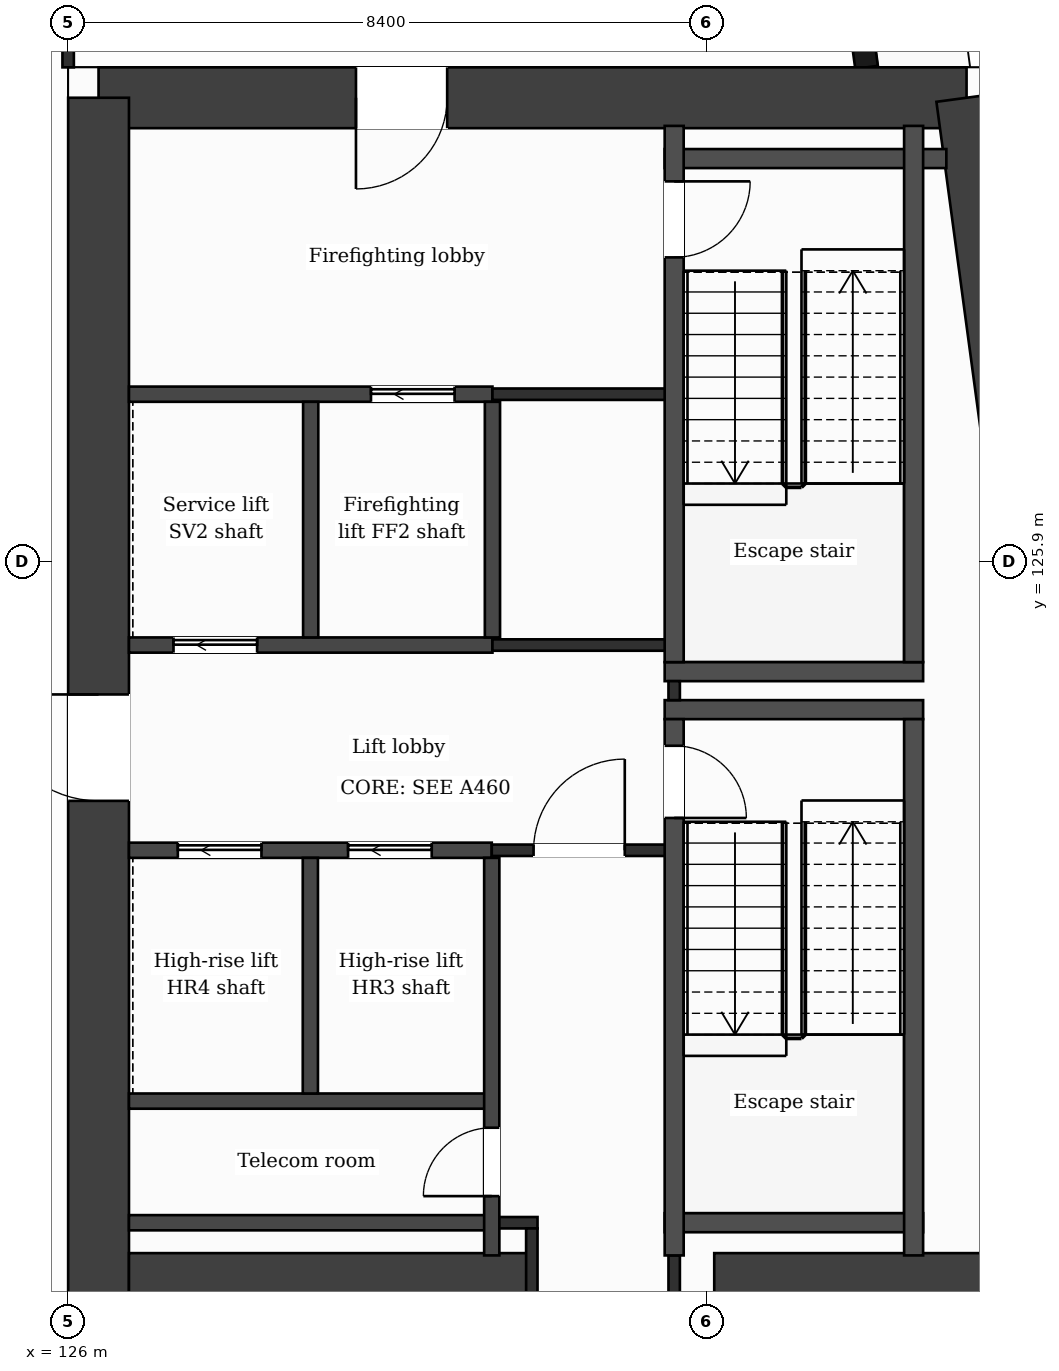
"""IFC4 building model, lengths in metres.
Left out: names, types, materials, properties, quantities, classifications, styles, units other than length and angle.
Written with IfcOpenShell. Run it as: python <this file> out.ifc"""

import sys

from ifc_helpers import new_model, si_unit, direction, frame, frame_2d, origin, place, context, subcontext, project, spatial, rectangle, extrude, element, fill, save


model = new_model("IFC4")
c1 = context("Model", 3, precision=1e-05, world=origin(), true_north=direction((0.0, 1.0)))
c2 = subcontext(c1, "Body", "Model", "MODEL_VIEW")
j1 = project(units=[si_unit("LENGTHUNIT", "METRE"), si_unit("PLANEANGLEUNIT", "RADIAN")], contexts=[c1])
p1 = place(None, origin())
s1 = spatial("IfcSite", under=j1, at=p1, CompositionType="ELEMENT")
p2 = place(p1, origin())
s2 = spatial("IfcBuilding", under=s1, at=p2, CompositionType="ELEMENT")
p3 = place(p2, frame((0.0, 0.0, 242.9)))
s3 = spatial("IfcBuildingStorey", under=s2, at=p3, CompositionType="ELEMENT", Elevation=242.9)
p4 = place(p3, frame((126.4, 132.0, 0.0), z_axis=(0.0, 0.0, 1.0), x_axis=(1.0, 0.0, 0.0)))
e1 = element("IfcWall", 1, at=p4, inside=s3, PredefinedType="SHEAR", context=c2, shape_type="SweptSolid", body=[
    extrude(rectangle(XDim=11.42, YDim=0.8, at=frame_2d((5.71, 0.0))), origin(), (0.0, 0.0, 1.0), 3.7),
])
p5 = place(p4, frame((3.386, 0.0, 0.0)))
e2 = element("IfcOpeningElement", 2, at=p5, cuts=e1, PredefinedType="OPENING", context=c2, shape_type="SweptSolid", body=[
    extrude(rectangle(XDim=1.2, YDim=2.1, at=frame_2d((0.6, 1.05))), frame((0.0, 0.41, 0.0), z_axis=(0.0, -1.0, 0.0), x_axis=(1.0, 0.0, 0.0)), (0.0, 0.0, 1.0), 0.82),
])
p6 = place(p3, frame((137.82, 132.0, 0.0), z_axis=(0.0, 0.0, 1.0), x_axis=(0.133408347329, -0.991061154956, 0.0)))
e3 = element("IfcWall", 3, at=p6, inside=s3, PredefinedType="SHEAR", context=c2, shape_type="SweptSolid", body=[
    extrude(rectangle(XDim=21.391, YDim=0.8, at=frame_2d((10.696, 0.0))), origin(), (0.0, 0.0, 1.0), 3.7),
])
p7 = place(p3, frame((126.4, 110.8, 0.0), z_axis=(0.0, 0.0, 1.0), x_axis=(0.0, 1.0, 0.0)))
e4 = element("IfcWall", 4, at=p7, inside=s3, PredefinedType="SHEAR", context=c2, shape_type="SweptSolid", body=[
    extrude(rectangle(XDim=21.2, YDim=0.8, at=frame_2d((10.6, 0.0))), origin(), (0.0, 0.0, 1.0), 3.7),
])
p8 = place(p7, frame((11.95, 0.0, 0.0)))
e5 = element("IfcOpeningElement", 5, at=p8, cuts=e4, PredefinedType="OPENING", context=c2, shape_type="SweptSolid", body=[
    extrude(rectangle(XDim=1.4, YDim=2.1, at=frame_2d((0.7, 1.05))), frame((0.0, 0.41, 0.0), z_axis=(0.0, -1.0, 0.0), x_axis=(1.0, 0.0, 0.0)), (0.0, 0.0, 1.0), 0.82),
])
p9 = place(p3, frame((126.8, 116.4, 0.0), z_axis=(0.0, 0.0, 1.0), x_axis=(1.0, 0.0, 0.0)))
e6 = element("IfcWall", 6, at=p9, inside=s3, PredefinedType="SHEAR", context=c2, shape_type="SweptSolid", body=[
    extrude(rectangle(XDim=5.3, YDim=0.8, at=frame_2d((2.65, 0.0))), origin(), (0.0, 0.0, 1.0), 3.7),
])
p10 = place(p3, frame((134.5, 116.4, 0.0), z_axis=(0.0, 0.0, 1.0), x_axis=(1.0, 0.0, 0.0)))
e7 = element("IfcWall", 7, at=p10, inside=s3, PredefinedType="SHEAR", context=c2, shape_type="SweptSolid", body=[
    extrude(rectangle(XDim=5.077, YDim=0.8, at=frame_2d((2.539, 0.0))), origin(), (0.0, 0.0, 1.0), 3.7),
])
p11 = place(p3, frame((136.504, 132.4, 0.0), z_axis=(0.0, 0.0, 1.0), x_axis=(-0.133399697462, 0.99106231929, 0.0)))
e8 = element("IfcWall", 8, at=p11, inside=s3, PredefinedType="SOLIDWALL", context=c2, shape_type="SweptSolid", body=[
    extrude(rectangle(XDim=6.74, YDim=0.3, at=frame_2d((3.37, 0.0))), origin(), (0.0, 0.0, 1.0), 3.2),
])
p12 = place(p11, frame((1.115, 0.0, 0.0)))
e9 = element("IfcOpeningElement", 9, at=p12, cuts=e8, PredefinedType="OPENING", context=c2, shape_type="SweptSolid", body=[
    extrude(rectangle(XDim=1.2, YDim=2.4, at=frame_2d((0.6, 1.2))), frame((0.0, 0.16, 0.0), z_axis=(0.0, -1.0, 0.0), x_axis=(1.0, 0.0, 0.0)), (0.0, 0.0, 1.0), 0.32),
])
p13 = place(p11, frame((3.835, 0.0, 0.9)))
e10 = element("IfcOpeningElement", 10, at=p13, cuts=e8, PredefinedType="OPENING", context=c2, shape_type="SweptSolid", body=[
    extrude(rectangle(XDim=2.4, YDim=2.1, at=frame_2d((1.2, 1.05))), frame((0.0, 0.16, 0.0), z_axis=(0.0, -1.0, 0.0), x_axis=(1.0, 0.0, 0.0)), (0.0, 0.0, 1.0), 0.32),
])
p14 = place(p3, frame((126.8, 117.2, 0.0), z_axis=(0.0, 0.0, 1.0), x_axis=(1.0, 0.0, 0.0)))
e11 = element("IfcWall", 11, at=p14, inside=s3, PredefinedType="PARTITIONING", context=c2, shape_type="SweptSolid", body=[
    extrude(rectangle(XDim=4.773, YDim=0.2, at=frame_2d((2.386, 0.0))), origin(), (0.0, 0.0, 1.0), 3.2),
])
p15 = place(p3, frame((131.573, 117.2, 0.0), z_axis=(0.0, 0.0, 1.0), x_axis=(1.0, 0.0, 0.0)))
e12 = element("IfcWall", 12, at=p15, inside=s3, PredefinedType="PARTITIONING", context=c2, shape_type="SweptSolid", body=[
    extrude(rectangle(XDim=0.602, YDim=0.15, at=frame_2d((0.301, 0.0))), origin(), (0.0, 0.0, 1.0), 3.2),
])
p16 = place(p3, frame((133.848, 117.2, 0.0), z_axis=(0.0, 0.0, 1.0), x_axis=(1.0, 0.0, 0.0)))
e13 = element("IfcWall", 13, at=p16, inside=s3, PredefinedType="PARTITIONING", context=c2, shape_type="SweptSolid", body=[
    extrude(rectangle(XDim=3.4, YDim=0.25, at=frame_2d((1.7, 0.0))), origin(), (0.0, 0.0, 1.0), 3.2),
])
p17 = place(p3, frame((126.8, 118.8, 0.0), z_axis=(0.0, 0.0, 1.0), x_axis=(1.0, 0.0, 0.0)))
e14 = element("IfcWall", 14, at=p17, inside=s3, PredefinedType="PARTITIONING", context=c2, shape_type="SweptSolid", body=[
    extrude(rectangle(XDim=4.773, YDim=0.2, at=frame_2d((2.386, 0.0))), origin(), (0.0, 0.0, 1.0), 3.2),
])
p18 = place(p3, frame((126.8, 122.1, 0.0), z_axis=(0.0, 0.0, 1.0), x_axis=(1.0, 0.0, 0.0)))
e15 = element("IfcWall", 15, at=p18, inside=s3, PredefinedType="PARTITIONING", context=c2, shape_type="SweptSolid", body=[
    extrude(rectangle(XDim=4.773, YDim=0.2, at=frame_2d((2.386, 0.0))), origin(), (0.0, 0.0, 1.0), 3.2),
])
p19 = place(p18, frame((2.883, 0.0, 0.0)))
e16 = element("IfcOpeningElement", 16, at=p19, cuts=e15, PredefinedType="OPENING", context=c2, shape_type="SweptSolid", body=[
    extrude(rectangle(XDim=1.1, YDim=2.1, at=frame_2d((0.55, 1.05))), frame((0.0, 0.11, 0.0), z_axis=(0.0, -1.0, 0.0), x_axis=(1.0, 0.0, 0.0)), (0.0, 0.0, 1.0), 0.22),
])
p20 = place(p18, frame((0.643, 0.0, 0.0)))
e17 = element("IfcOpeningElement", 17, at=p20, cuts=e15, PredefinedType="OPENING", context=c2, shape_type="SweptSolid", body=[
    extrude(rectangle(XDim=1.1, YDim=2.1, at=frame_2d((0.55, 1.05))), frame((0.0, 0.11, 0.0), z_axis=(0.0, -1.0, 0.0), x_axis=(1.0, 0.0, 0.0)), (0.0, 0.0, 1.0), 0.22),
])
p21 = place(p3, frame((131.573, 122.1, 0.0), z_axis=(0.0, 0.0, 1.0), x_axis=(1.0, 0.0, 0.0)))
e18 = element("IfcWall", 18, at=p21, inside=s3, PredefinedType="PARTITIONING", context=c2, shape_type="SweptSolid", body=[
    extrude(rectangle(XDim=2.4, YDim=0.15, at=frame_2d((1.2, 0.0))), origin(), (0.0, 0.0, 1.0), 3.2),
])
p22 = place(p21, frame((0.55, 0.0, 0.0)))
e19 = element("IfcOpeningElement", 19, at=p22, cuts=e18, PredefinedType="OPENING", context=c2, shape_type="SweptSolid", body=[
    extrude(rectangle(XDim=1.2, YDim=2.1, at=frame_2d((0.6, 1.05))), frame((0.0, 0.085, 0.0), z_axis=(0.0, -1.0, 0.0), x_axis=(1.0, 0.0, 0.0)), (0.0, 0.0, 1.0), 0.17),
])
for number, where, z_axis, x_axis in (
    (20, (133.848, 123.95, 0.0), (0.0, 0.0, 1.0), (1.0, 0.0, 0.0)),
    (21, (133.848, 124.45, 0.0), (0.0, 0.0, 1.0), (1.0, 0.0, 0.0)),
):
    element("IfcWall", number, at=place(p3, frame(where, z_axis=z_axis, x_axis=x_axis)), inside=s3, PredefinedType="PARTITIONING", context=c2, shape_type="SweptSolid", body=[
        extrude(rectangle(XDim=3.4, YDim=0.25, at=frame_2d((1.7, 0.0))), origin(), (0.0, 0.0, 1.0), 3.2),
    ])
p23 = place(p3, frame((126.8, 124.8, 0.0), z_axis=(0.0, 0.0, 1.0), x_axis=(1.0, 0.0, 0.0)))
e22 = element("IfcWall", 22, at=p23, inside=s3, PredefinedType="PARTITIONING", context=c2, shape_type="SweptSolid", body=[
    extrude(rectangle(XDim=4.782, YDim=0.2, at=frame_2d((2.391, 0.0))), origin(), (0.0, 0.0, 1.0), 3.2),
])
p24 = place(p23, frame((0.586, 0.0, 0.0)))
e23 = element("IfcOpeningElement", 23, at=p24, cuts=e22, PredefinedType="OPENING", context=c2, shape_type="SweptSolid", body=[
    extrude(rectangle(XDim=1.1, YDim=2.1, at=frame_2d((0.55, 1.05))), frame((0.0, 0.11, 0.0), z_axis=(0.0, -1.0, 0.0), x_axis=(1.0, 0.0, 0.0)), (0.0, 0.0, 1.0), 0.22),
])
p25 = place(p3, frame((131.582, 124.8, 0.0), z_axis=(0.0, 0.0, 1.0), x_axis=(1.0, 0.0, 0.0)))
e24 = element("IfcWall", 24, at=p25, inside=s3, PredefinedType="PARTITIONING", context=c2, shape_type="SweptSolid", body=[
    extrude(rectangle(XDim=2.516, YDim=0.15, at=frame_2d((1.258, 0.0))), origin(), (0.0, 0.0, 1.0), 3.2),
])
p26 = place(p3, frame((126.8, 128.1, 0.0), z_axis=(0.0, 0.0, 1.0), x_axis=(1.0, 0.0, 0.0)))
e25 = element("IfcWall", 25, at=p26, inside=s3, PredefinedType="PARTITIONING", context=c2, shape_type="SweptSolid", body=[
    extrude(rectangle(XDim=4.782, YDim=0.2, at=frame_2d((2.391, 0.0))), origin(), (0.0, 0.0, 1.0), 3.2),
])
p27 = place(p26, frame((3.184, 0.0, 0.0)))
e26 = element("IfcOpeningElement", 26, at=p27, cuts=e25, PredefinedType="OPENING", context=c2, shape_type="SweptSolid", body=[
    extrude(rectangle(XDim=1.1, YDim=2.1, at=frame_2d((0.55, 1.05))), frame((0.0, 0.11, 0.0), z_axis=(0.0, -1.0, 0.0), x_axis=(1.0, 0.0, 0.0)), (0.0, 0.0, 1.0), 0.22),
])
p28 = place(p3, frame((131.582, 128.1, 0.0), z_axis=(0.0, 0.0, 1.0), x_axis=(1.0, 0.0, 0.0)))
e27 = element("IfcWall", 27, at=p28, inside=s3, PredefinedType="PARTITIONING", context=c2, shape_type="SweptSolid", body=[
    extrude(rectangle(XDim=2.391, YDim=0.15, at=frame_2d((1.195, 0.0))), origin(), (0.0, 0.0, 1.0), 3.2),
])
p29 = place(p3, frame((133.848, 131.2, 0.0), z_axis=(0.0, 0.0, 1.0), x_axis=(1.0, 0.0, 0.0)))
e28 = element("IfcWall", 28, at=p29, inside=s3, PredefinedType="PARTITIONING", context=c2, shape_type="SweptSolid", body=[
    extrude(rectangle(XDim=3.706, YDim=0.25, at=frame_2d((1.853, 0.0))), origin(), (0.0, 0.0, 1.0), 3.2),
])
p30 = place(p3, frame((126.0, 132.4, 0.0), z_axis=(0.0, 0.0, 1.0), x_axis=(0.0, 1.0, 0.0)))
e29 = element("IfcWall", 29, at=p30, inside=s3, PredefinedType="PARTITIONING", context=c2, shape_type="SweptSolid", body=[
    extrude(rectangle(XDim=1.325, YDim=0.15, at=frame_2d((0.663, 0.0))), origin(), (0.0, 0.0, 1.0), 3.2),
])
for number, where, z_axis, x_axis in (
    (30, (129.187, 118.9, 0.0), (0.0, 0.0, 1.0), (0.0, 1.0, 0.0)),
    (31, (129.191, 124.9, 0.0), (0.0, 0.0, 1.0), (0.0, 1.0, 0.0)),
):
    element("IfcWall", number, at=place(p3, frame(where, z_axis=z_axis, x_axis=x_axis)), inside=s3, PredefinedType="PARTITIONING", context=c2, shape_type="SweptSolid", body=[
        extrude(rectangle(XDim=3.1, YDim=0.2, at=frame_2d((1.55, 0.0))), origin(), (0.0, 0.0, 1.0), 3.2),
    ])
p31 = place(p3, frame((131.573, 116.77, 0.0), z_axis=(0.0, 0.0, 1.0), x_axis=(0.0, 1.0, 0.0)))
e32 = element("IfcWall", 32, at=p31, inside=s3, PredefinedType="PARTITIONING", context=c2, shape_type="SweptSolid", body=[
    extrude(rectangle(XDim=5.23, YDim=0.2, at=frame_2d((2.615, 0.0))), origin(), (0.0, 0.0, 1.0), 3.2),
])
p32 = place(p31, frame((0.78, 0.0, 0.0)))
e33 = element("IfcOpeningElement", 33, at=p32, cuts=e32, PredefinedType="OPENING", context=c2, shape_type="SweptSolid", body=[
    extrude(rectangle(XDim=0.9, YDim=2.1, at=frame_2d((0.45, 1.05))), frame((0.0, 0.11, 0.0), z_axis=(0.0, -1.0, 0.0), x_axis=(1.0, 0.0, 0.0)), (0.0, 0.0, 1.0), 0.22),
])
p33 = place(p3, frame((131.582, 124.9, 0.0), z_axis=(0.0, 0.0, 1.0), x_axis=(0.0, 1.0, 0.0)))
e34 = element("IfcWall", 34, at=p33, inside=s3, PredefinedType="PARTITIONING", context=c2, shape_type="SweptSolid", body=[
    extrude(rectangle(XDim=3.1, YDim=0.2, at=frame_2d((1.55, 0.0))), origin(), (0.0, 0.0, 1.0), 3.2),
])
p34 = place(p3, frame((132.1, 116.0, 0.0), z_axis=(0.0, 0.0, 1.0), x_axis=(0.0, 1.0, 0.0)))
e35 = element("IfcWall", 35, at=p34, inside=s3, PredefinedType="PARTITIONING", context=c2, shape_type="SweptSolid", body=[
    extrude(rectangle(XDim=1.125, YDim=0.15, at=frame_2d((0.562, 0.0))), origin(), (0.0, 0.0, 1.0), 3.2),
])
p35 = place(p3, frame((133.973, 116.0, 0.0), z_axis=(0.0, 0.0, 1.0), x_axis=(0.0, 1.0, 0.0)))
e36 = element("IfcWall", 36, at=p35, inside=s3, PredefinedType="PARTITIONING", context=c2, shape_type="SweptSolid", body=[
    extrude(rectangle(XDim=0.77, YDim=0.15, at=frame_2d((0.385, 0.0))), origin(), (0.0, 0.0, 1.0), 3.2),
])
p36 = place(p3, frame((133.973, 124.075, 0.0), z_axis=(0.0, 0.0, 1.0), x_axis=(0.0, 1.0, 0.0)))
e37 = element("IfcWall", 37, at=p36, inside=s3, PredefinedType="PARTITIONING", context=c2, shape_type="SweptSolid", body=[
    extrude(rectangle(XDim=0.25, YDim=0.15, at=frame_2d((0.125, 0.0))), origin(), (0.0, 0.0, 1.0), 3.2),
])
p37 = place(p3, frame((133.973, 116.77, 0.0), z_axis=(0.0, 0.0, 1.0), x_axis=(0.0, 1.0, 0.0)))
e38 = element("IfcWall", 38, at=p37, inside=s3, PredefinedType="PARTITIONING", context=c2, shape_type="SweptSolid", body=[
    extrude(rectangle(XDim=7.055, YDim=0.25, at=frame_2d((3.527, 0.0))), origin(), (0.0, 0.0, 1.0), 3.2),
])
p38 = place(p37, frame((5.755, 0.0, 0.0)))
e39 = element("IfcOpeningElement", 39, at=p38, cuts=e38, PredefinedType="OPENING", context=c2, shape_type="SweptSolid", body=[
    extrude(rectangle(XDim=0.95, YDim=2.1, at=frame_2d((0.475, 1.05))), frame((0.0, 0.135, 0.0), z_axis=(0.0, -1.0, 0.0), x_axis=(1.0, 0.0, 0.0)), (0.0, 0.0, 1.0), 0.27),
])
p39 = place(p3, frame((133.973, 124.575, 0.0), z_axis=(0.0, 0.0, 1.0), x_axis=(0.0, 1.0, 0.0)))
e40 = element("IfcWall", 40, at=p39, inside=s3, PredefinedType="PARTITIONING", context=c2, shape_type="SweptSolid", body=[
    extrude(rectangle(XDim=7.055, YDim=0.25, at=frame_2d((3.527, 0.0))), origin(), (0.0, 0.0, 1.0), 3.2),
])
p40 = place(p39, frame((5.325, 0.0, 0.0)))
e41 = element("IfcOpeningElement", 41, at=p40, cuts=e40, PredefinedType="OPENING", context=c2, shape_type="SweptSolid", body=[
    extrude(rectangle(XDim=1.0, YDim=2.1, at=frame_2d((0.5, 1.05))), frame((0.0, 0.135, 0.0), z_axis=(0.0, -1.0, 0.0), x_axis=(1.0, 0.0, 0.0)), (0.0, 0.0, 1.0), 0.27),
])
for number, where, z_axis, x_axis in (
    (42, (137.123, 116.77, 0.0), (0.0, 0.0, 1.0), (0.0, 1.0, 0.0)),
    (43, (137.123, 124.575, 0.0), (0.0, 0.0, 1.0), (0.0, 1.0, 0.0)),
):
    element("IfcWall", number, at=place(p3, frame(where, z_axis=z_axis, x_axis=x_axis)), inside=s3, PredefinedType="PARTITIONING", context=c2, shape_type="SweptSolid", body=[
        extrude(rectangle(XDim=7.055, YDim=0.25, at=frame_2d((3.527, 0.0))), origin(), (0.0, 0.0, 1.0), 3.2),
    ])
p41 = place(p22, origin())
e44 = element("IfcDoor", 44, at=p41, inside=s3, OperationType="SINGLE_SWING_RIGHT", PredefinedType="DOOR", context=c2, shape_type="SweptSolid", body=[
    extrude(rectangle(XDim=1.2, YDim=2.1, at=frame_2d((0.6, 1.05))), frame((0.0, 0.025, 0.0), z_axis=(0.0, -1.0, 0.0), x_axis=(1.0, 0.0, 0.0)), (0.0, 0.0, 1.0), 0.05),
])
fill(e19, e44)
p42 = place(p19, origin())
e45 = element("IfcDoor", 45, at=p42, inside=s3, OperationType="SLIDING_TO_LEFT", PredefinedType="DOOR", context=c2, shape_type="SweptSolid", body=[
    extrude(rectangle(XDim=1.1, YDim=2.1, at=frame_2d((0.55, 1.05))), frame((0.0, 0.025, 0.0), z_axis=(0.0, -1.0, 0.0), x_axis=(1.0, 0.0, 0.0)), (0.0, 0.0, 1.0), 0.05),
])
fill(e16, e45)
p43 = place(p20, origin())
e46 = element("IfcDoor", 46, at=p43, inside=s3, OperationType="SLIDING_TO_LEFT", PredefinedType="DOOR", context=c2, shape_type="SweptSolid", body=[
    extrude(rectangle(XDim=1.1, YDim=2.1, at=frame_2d((0.55, 1.05))), frame((0.0, 0.025, 0.0), z_axis=(0.0, -1.0, 0.0), x_axis=(1.0, 0.0, 0.0)), (0.0, 0.0, 1.0), 0.05),
])
fill(e17, e46)
p44 = place(p27, origin())
e47 = element("IfcDoor", 47, at=p44, inside=s3, OperationType="SLIDING_TO_LEFT", PredefinedType="DOOR", context=c2, shape_type="SweptSolid", body=[
    extrude(rectangle(XDim=1.1, YDim=2.1, at=frame_2d((0.55, 1.05))), frame((0.0, 0.025, 0.0), z_axis=(0.0, -1.0, 0.0), x_axis=(1.0, 0.0, 0.0)), (0.0, 0.0, 1.0), 0.05),
])
fill(e26, e47)
p45 = place(p24, origin())
e48 = element("IfcDoor", 48, at=p45, inside=s3, OperationType="SLIDING_TO_LEFT", PredefinedType="DOOR", context=c2, shape_type="SweptSolid", body=[
    extrude(rectangle(XDim=1.1, YDim=2.1, at=frame_2d((0.55, 1.05))), frame((0.0, 0.025, 0.0), z_axis=(0.0, -1.0, 0.0), x_axis=(1.0, 0.0, 0.0)), (0.0, 0.0, 1.0), 0.05),
])
fill(e23, e48)
p46 = place(p38, origin())
e49 = element("IfcDoor", 49, at=p46, inside=s3, OperationType="SINGLE_SWING_LEFT", PredefinedType="DOOR", context=c2, shape_type="SweptSolid", body=[
    extrude(rectangle(XDim=0.95, YDim=2.1, at=frame_2d((0.475, 1.05))), frame((0.0, 0.025, 0.0), z_axis=(0.0, -1.0, 0.0), x_axis=(1.0, 0.0, 0.0)), (0.0, 0.0, 1.0), 0.05),
])
fill(e39, e49)
p47 = place(p40, origin())
e50 = element("IfcDoor", 50, at=p47, inside=s3, OperationType="SINGLE_SWING_RIGHT", PredefinedType="DOOR", context=c2, shape_type="SweptSolid", body=[
    extrude(rectangle(XDim=1.0, YDim=2.1, at=frame_2d((0.5, 1.05))), frame((0.0, 0.025, 0.0), z_axis=(0.0, -1.0, 0.0), x_axis=(1.0, 0.0, 0.0)), (0.0, 0.0, 1.0), 0.05),
])
fill(e41, e50)
p48 = place(p32, origin())
e51 = element("IfcDoor", 51, at=p48, inside=s3, OperationType="SINGLE_SWING_LEFT", PredefinedType="DOOR", context=c2, shape_type="SweptSolid", body=[
    extrude(rectangle(XDim=0.9, YDim=2.1, at=frame_2d((0.45, 1.05))), frame((0.0, 0.025, 0.0), z_axis=(0.0, -1.0, 0.0), x_axis=(1.0, 0.0, 0.0)), (0.0, 0.0, 1.0), 0.05),
])
fill(e33, e51)
p49 = place(p5, origin())
e52 = element("IfcDoor", 52, at=p49, inside=s3, OperationType="SINGLE_SWING_LEFT", PredefinedType="DOOR", context=c2, shape_type="SweptSolid", body=[
    extrude(rectangle(XDim=1.2, YDim=2.1, at=frame_2d((0.6, 1.05))), frame((0.0, 0.025, 0.0), z_axis=(0.0, -1.0, 0.0), x_axis=(1.0, 0.0, 0.0)), (0.0, 0.0, 1.0), 0.05),
])
fill(e2, e52)
p50 = place(p8, origin())
e53 = element("IfcDoor", 53, at=p50, inside=s3, OperationType="SINGLE_SWING_RIGHT", PredefinedType="DOOR", context=c2, shape_type="SweptSolid", body=[
    extrude(rectangle(XDim=1.4, YDim=2.1, at=frame_2d((0.7, 1.05))), frame((0.0, 0.025, 0.0), z_axis=(0.0, -1.0, 0.0), x_axis=(1.0, 0.0, 0.0)), (0.0, 0.0, 1.0), 0.05),
])
fill(e5, e53)
save(model, sys.argv[1])
